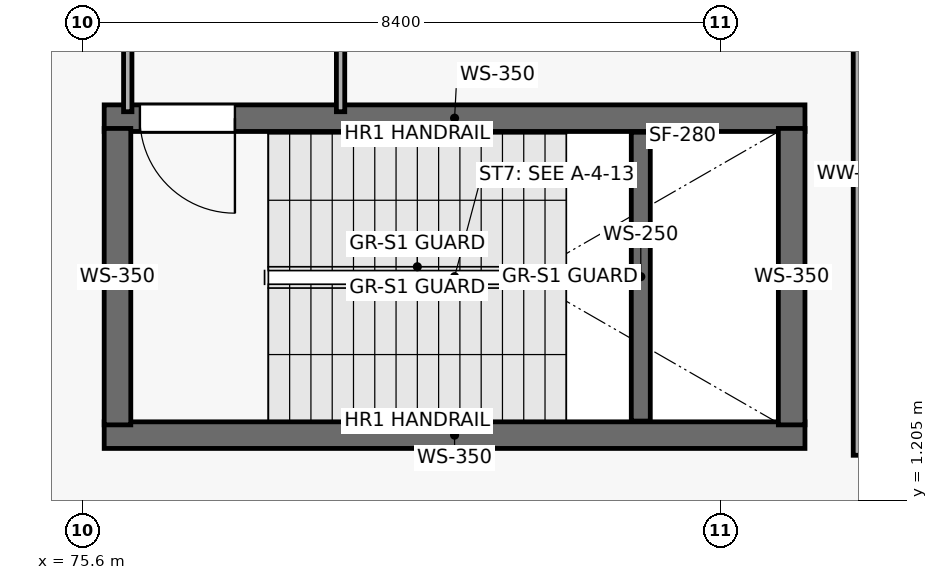
"""IFC4 building model, lengths in metres.
Left out: names, types, materials, properties, quantities, classifications, styles, units other than length and angle.
Written with IfcOpenShell. Run it as: python <this file> out.ifc"""

import sys

from ifc_helpers import new_model, si_unit, direction, frame, frame_2d, origin, place, context, subcontext, project, spatial, rectangle, extrude, element, fill, save


model = new_model("IFC4")
c1 = context("Model", 3, precision=1e-05, world=origin(), true_north=direction((0.0, 1.0)))
c2 = subcontext(c1, "Body", "Model", "MODEL_VIEW")
j1 = project(units=[si_unit("LENGTHUNIT", "METRE"), si_unit("PLANEANGLEUNIT", "RADIAN")], contexts=[c1])
p1 = place(None, origin())
s1 = spatial("IfcSite", under=j1, at=p1, CompositionType="ELEMENT")
p2 = place(p1, origin())
s2 = spatial("IfcBuilding", under=s1, at=p2, CompositionType="ELEMENT")
p3 = place(p2, origin())
s3 = spatial("IfcBuildingStorey", under=s2, at=p3, CompositionType="ELEMENT", Elevation=0.0)
p4 = place(p3, frame((75.89, 2.065, 0.0), z_axis=(0.0, 0.0, 1.0), x_axis=(1.0, 0.0, 0.0)))
e1 = element("IfcWall", 1, at=p4, inside=s3, PredefinedType="SHEAR", context=c2, shape_type="SweptSolid", body=[
    extrude(rectangle(XDim=9.22, YDim=0.35, at=frame_2d((4.61, 0.0))), origin(), (0.0, 0.0, 1.0), 5.12),
])
p5 = place(p3, frame((85.11, 6.235, 0.0), z_axis=(0.0, 0.0, 1.0), x_axis=(-1.0, 0.0, 0.0)))
e2 = element("IfcWall", 2, at=p5, inside=s3, PredefinedType="SHEAR", context=c2, shape_type="SweptSolid", body=[
    extrude(rectangle(XDim=9.22, YDim=0.35, at=frame_2d((4.61, 0.0))), origin(), (0.0, 0.0, 1.0), 5.12),
])
p6 = place(p5, frame((7.5, 0.0, 0.0)))
e3 = element("IfcOpeningElement", 3, at=p6, cuts=e2, PredefinedType="OPENING", context=c2, shape_type="SweptSolid", body=[
    extrude(rectangle(XDim=1.25, YDim=2.2, at=frame_2d((0.625, 1.1))), frame((0.0, 0.185, 0.0), z_axis=(0.0, -1.0, 0.0), x_axis=(1.0, 0.0, 0.0)), (0.0, 0.0, 1.0), 0.37),
])
for number, where, z_axis, x_axis in (
    (4, (76.065, 2.2, 0.0), (0.0, 0.0, 1.0), (0.0, 1.0, 0.0)),
    (5, (84.935, 6.1, 0.0), (0.0, 0.0, 1.0), (0.0, -1.0, 0.0)),
):
    element("IfcWall", number, at=place(p3, frame(where, z_axis=z_axis, x_axis=x_axis)), inside=s3, PredefinedType="SHEAR", context=c2, shape_type="SweptSolid", body=[
        extrude(rectangle(XDim=3.9, YDim=0.35, at=frame_2d((1.95, 0.0))), origin(), (0.0, 0.0, 1.0), 5.12),
    ])
p7 = place(p3, frame((82.95, 2.25, 0.0), z_axis=(0.0, 0.0, 1.0), x_axis=(0.0, 1.0, 0.0)))
e6 = element("IfcWall", 6, at=p7, inside=s3, PredefinedType="SHEAR", context=c2, shape_type="SweptSolid", body=[
    extrude(rectangle(XDim=3.8, YDim=0.25, at=frame_2d((1.9, 0.0))), origin(), (0.0, 0.0, 1.0), 2.52),
])
p8 = place(p3, frame((85.8, 9.2, 0.0), z_axis=(0.0, 0.0, 1.0), x_axis=(0.0, -1.0, 0.0)))
e7 = element("IfcWall", 7, at=p8, inside=s3, PredefinedType="PARTITIONING", context=c2, shape_type="SweptSolid", body=[
    extrude(rectangle(XDim=7.4, YDim=0.11, at=frame_2d((3.7, 0.0))), origin(), (0.0, 0.0, 1.0), 5.12),
])
p9 = place(p3, frame((76.2, 9.065, 0.0), z_axis=(0.0, 0.0, 1.0), x_axis=(0.0, -1.0, 0.0)))
e8 = element("IfcWall", 8, at=p9, inside=s3, PredefinedType="PARTITIONING", context=c2, shape_type="SweptSolid", body=[
    extrude(rectangle(XDim=2.745, YDim=0.11, at=frame_2d((1.373, 0.0))), origin(), (0.0, 0.0, 1.0), 4.31),
])
p10 = place(p3, frame((79.0, 6.32, 0.0), z_axis=(0.0, 0.0, 1.0), x_axis=(0.0, 1.0, 0.0)))
e9 = element("IfcWall", 9, at=p10, inside=s3, PredefinedType="PARTITIONING", context=c2, shape_type="SweptSolid", body=[
    extrude(rectangle(XDim=2.745, YDim=0.11, at=frame_2d((1.373, 0.0))), origin(), (0.0, 0.0, 1.0), 5.12),
])
p11 = place(p6, origin())
e10 = element("IfcDoor", 10, at=p11, inside=s3, OperationType="SINGLE_SWING_LEFT", PredefinedType="DOOR", context=c2, shape_type="SweptSolid", body=[
    extrude(rectangle(XDim=1.25, YDim=2.2, at=frame_2d((0.625, 1.1))), frame((0.0, 0.025, 0.0), z_axis=(0.0, -1.0, 0.0), x_axis=(1.0, 0.0, 0.0)), (0.0, 0.0, 1.0), 0.05),
])
fill(e3, e10)
save(model, sys.argv[1])
